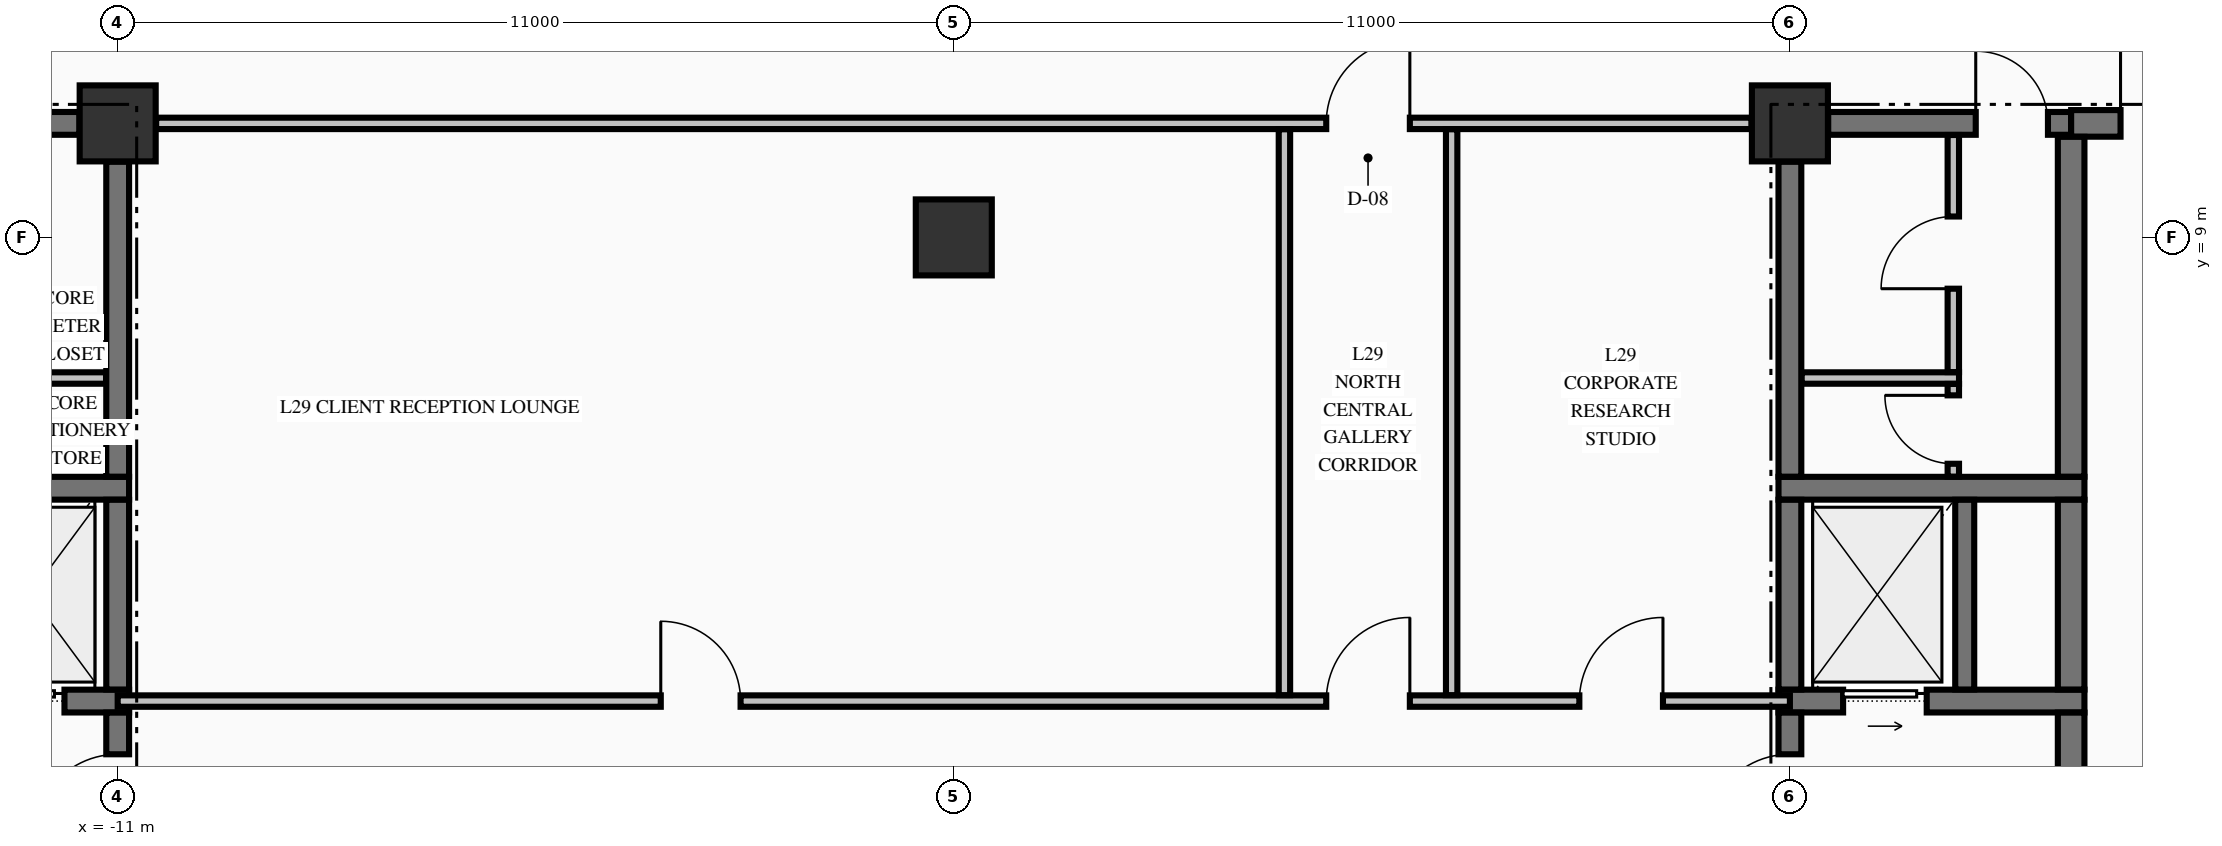
"""IFC4 building model, lengths in metres.
Left out: names, types, materials, properties, quantities, classifications, styles, units other than length and angle.
Written with IfcOpenShell. Run it as: python <this file> out.ifc"""

import sys

from ifc_helpers import new_model, si_unit, direction, frame, frame_2d, origin, origin_2d, place, context, subcontext, project, spatial, rectangle, extrude, element, fill, save


model = new_model("IFC4")
c1 = context("Model", 3, precision=1e-05, world=origin(), true_north=direction((0.0, 1.0)))
c2 = subcontext(c1, "Body", "Model", "MODEL_VIEW")
j1 = project(units=[si_unit("LENGTHUNIT", "METRE"), si_unit("PLANEANGLEUNIT", "RADIAN")], contexts=[c1])
p1 = place(None, origin())
s1 = spatial("IfcSite", under=j1, at=p1, CompositionType="ELEMENT")
p2 = place(p1, origin())
s2 = spatial("IfcBuilding", under=s1, at=p2, CompositionType="ELEMENT")
p3 = place(p2, frame((0.0, 0.0, 116.35)))
s3 = spatial("IfcBuildingStorey", under=s2, at=p3, CompositionType="ELEMENT", Elevation=116.35)
for number, where, z_axis, x_axis in (
    (1, (-11.0, 10.5, -0.425), (0.0, 0.0, 1.0), (1.0, 0.0, 0.0)),
    (2, (11.0, 10.5, -0.425), (0.0, 0.0, 1.0), (1.0, 0.0, 0.0)),
    (3, (0.0, 9.0, -0.425), (0.0, 0.0, 1.0), (1.0, 0.0, 0.0)),
):
    element("IfcColumn", number, at=place(p3, frame(where, z_axis=z_axis, x_axis=x_axis)), inside=s3, PredefinedType="COLUMN", context=c2, shape_type="SweptSolid", body=[
        extrude(rectangle(XDim=1.0, YDim=1.0, at=origin_2d()), origin(), (0.0, 0.0, 1.0), 5.0),
    ])
p4 = place(p3, frame((-14.875, 2.9, 0.0), z_axis=(0.0, 0.0, 1.0), x_axis=(1.0, 0.0, 0.0)))
e4 = element("IfcWall", 4, at=p4, inside=s3, PredefinedType="SHEAR", context=c2, shape_type="SweptSolid", body=[
    extrude(rectangle(XDim=4.025, YDim=0.3, at=frame_2d((2.012, 0.0))), origin(), (0.0, 0.0, 1.0), 4.575),
])
p5 = place(p4, frame((2.075, 0.0, 0.0)))
e5 = element("IfcOpeningElement", 5, at=p5, cuts=e4, PredefinedType="OPENING", context=c2, shape_type="SweptSolid", body=[
    extrude(rectangle(XDim=1.1, YDim=2.2, at=frame_2d((0.55, 1.1))), frame((0.0, 0.16, 0.0), z_axis=(0.0, -1.0, 0.0), x_axis=(1.0, 0.0, 0.0)), (0.0, 0.0, 1.0), 0.32),
])
p6 = place(p3, frame((10.85, 2.9, 0.0), z_axis=(0.0, 0.0, 1.0), x_axis=(1.0, 0.0, 0.0)))
e6 = element("IfcWall", 6, at=p6, inside=s3, PredefinedType="SHEAR", context=c2, shape_type="SweptSolid", body=[
    extrude(rectangle(XDim=4.025, YDim=0.3, at=frame_2d((2.012, 0.0))), origin(), (0.0, 0.0, 1.0), 4.575),
])
p7 = place(p6, frame((0.85, 0.0, 0.0)))
e7 = element("IfcOpeningElement", 7, at=p7, cuts=e6, PredefinedType="OPENING", context=c2, shape_type="SweptSolid", body=[
    extrude(rectangle(XDim=1.1, YDim=2.2, at=frame_2d((0.55, 1.1))), frame((0.0, 0.16, 0.0), z_axis=(0.0, -1.0, 0.0), x_axis=(1.0, 0.0, 0.0)), (0.0, 0.0, 1.0), 0.32),
])
for number, where, z_axis, x_axis in (
    (8, (-14.875, 5.7, 0.0), (0.0, 0.0, 1.0), (1.0, 0.0, 0.0)),
    (9, (10.85, 5.7, 0.0), (0.0, 0.0, 1.0), (1.0, 0.0, 0.0)),
):
    element("IfcWall", number, at=place(p3, frame(where, z_axis=z_axis, x_axis=x_axis)), inside=s3, PredefinedType="SHEAR", context=c2, shape_type="SweptSolid", body=[
        extrude(rectangle(XDim=4.025, YDim=0.3, at=frame_2d((2.012, 0.0))), origin(), (0.0, 0.0, 1.0), 4.575),
    ])
p8 = place(p3, frame((-14.7, 10.5, 0.0), z_axis=(0.0, 0.0, 1.0), x_axis=(1.0, 0.0, 0.0)))
e10 = element("IfcWall", 10, at=p8, inside=s3, PredefinedType="SHEAR", context=c2, shape_type="SweptSolid", body=[
    extrude(rectangle(XDim=3.196, YDim=0.3, at=frame_2d((1.598, 0.0))), origin(), (0.0, 0.0, 1.0), 4.575),
])
p9 = place(p8, frame((0.305, 0.0, 0.0)))
e11 = element("IfcOpeningElement", 11, at=p9, cuts=e10, PredefinedType="OPENING", context=c2, shape_type="SweptSolid", body=[
    extrude(rectangle(XDim=0.95, YDim=2.15, at=frame_2d((0.475, 1.075))), frame((0.0, 0.16, 0.0), z_axis=(0.0, -1.0, 0.0), x_axis=(1.0, 0.0, 0.0)), (0.0, 0.0, 1.0), 0.32),
])
p10 = place(p3, frame((11.504, 10.5, 0.0), z_axis=(0.0, 0.0, 1.0), x_axis=(1.0, 0.0, 0.0)))
e12 = element("IfcWall", 12, at=p10, inside=s3, PredefinedType="SHEAR", context=c2, shape_type="SweptSolid", body=[
    extrude(rectangle(XDim=3.196, YDim=0.3, at=frame_2d((1.598, 0.0))), origin(), (0.0, 0.0, 1.0), 4.575),
])
p11 = place(p10, frame((1.941, 0.0, 0.0)))
e13 = element("IfcOpeningElement", 13, at=p11, cuts=e12, PredefinedType="OPENING", context=c2, shape_type="SweptSolid", body=[
    extrude(rectangle(XDim=0.95, YDim=2.15, at=frame_2d((0.475, 1.075))), frame((0.0, 0.16, 0.0), z_axis=(0.0, -1.0, 0.0), x_axis=(1.0, 0.0, 0.0)), (0.0, 0.0, 1.0), 0.32),
])
p12 = place(p3, frame((14.7, 10.5, 0.0), z_axis=(0.0, 0.0, 1.0), x_axis=(1.0, 0.0, 0.0)))
e14 = element("IfcWall", 14, at=p12, inside=s3, PredefinedType="SHEAR", context=c2, shape_type="SweptSolid", body=[
    extrude(rectangle(XDim=4.796, YDim=0.35, at=frame_2d((2.398, 0.0))), origin(), (0.0, 0.0, 1.0), 4.575),
])
p13 = place(p12, frame((0.65, 0.0, 0.0)))
e15 = element("IfcOpeningElement", 15, at=p13, cuts=e14, PredefinedType="OPENING", context=c2, shape_type="SweptSolid", body=[
    extrude(rectangle(XDim=1.2, YDim=2.15, at=frame_2d((0.6, 1.075))), frame((0.0, 0.185, 0.0), z_axis=(0.0, -1.0, 0.0), x_axis=(1.0, 0.0, 0.0)), (0.0, 0.0, 1.0), 0.37),
])
p14 = place(p12, frame((3.225, 0.0, 0.0)))
e16 = element("IfcOpeningElement", 16, at=p14, cuts=e14, PredefinedType="OPENING", context=c2, shape_type="SweptSolid", body=[
    extrude(rectangle(XDim=0.95, YDim=2.15, at=frame_2d((0.475, 1.075))), frame((0.0, 0.185, 0.0), z_axis=(0.0, -1.0, 0.0), x_axis=(1.0, 0.0, 0.0)), (0.0, 0.0, 1.0), 0.37),
])
p15 = place(p3, frame((-11.0, 2.9, 0.0), z_axis=(0.0, 0.0, 1.0), x_axis=(1.0, 0.0, 0.0)))
e17 = element("IfcWall", 17, at=p15, inside=s3, PredefinedType="PARTITIONING", context=c2, shape_type="SweptSolid", body=[
    extrude(rectangle(XDim=22.0, YDim=0.15, at=frame_2d((11.0, 0.0))), origin(), (0.0, 0.0, 1.0), 4.575),
])
p16 = place(p15, frame((15.9, 0.0, 0.0)))
e18 = element("IfcOpeningElement", 18, at=p16, cuts=e17, PredefinedType="OPENING", context=c2, shape_type="SweptSolid", body=[
    extrude(rectangle(XDim=1.1, YDim=2.15, at=frame_2d((0.55, 1.075))), frame((0.0, 0.085, 0.0), z_axis=(0.0, -1.0, 0.0), x_axis=(1.0, 0.0, 0.0)), (0.0, 0.0, 1.0), 0.17),
])
p17 = place(p15, frame((7.145, 0.0, 0.0)))
e19 = element("IfcOpeningElement", 19, at=p17, cuts=e17, PredefinedType="OPENING", context=c2, shape_type="SweptSolid", body=[
    extrude(rectangle(XDim=1.05, YDim=2.15, at=frame_2d((0.525, 1.075))), frame((0.0, 0.085, 0.0), z_axis=(0.0, -1.0, 0.0), x_axis=(1.0, 0.0, 0.0)), (0.0, 0.0, 1.0), 0.17),
])
p18 = place(p15, frame((19.23, 0.0, 0.0)))
e20 = element("IfcOpeningElement", 20, at=p18, cuts=e17, PredefinedType="OPENING", context=c2, shape_type="SweptSolid", body=[
    extrude(rectangle(XDim=1.1, YDim=2.15, at=frame_2d((0.55, 1.075))), frame((0.0, 0.085, 0.0), z_axis=(0.0, -1.0, 0.0), x_axis=(1.0, 0.0, 0.0)), (0.0, 0.0, 1.0), 0.17),
])
for number, where, z_axis, x_axis in (
    (21, (-13.225, 7.15, 0.0), (0.0, 0.0, 1.0), (1.0, 0.0, 0.0)),
    (22, (11.153, 7.15, 0.0), (0.0, 0.0, 1.0), (1.0, 0.0, 0.0)),
):
    element("IfcWall", number, at=place(p3, frame(where, z_axis=z_axis, x_axis=x_axis)), inside=s3, PredefinedType="PARTITIONING", context=c2, shape_type="SweptSolid", body=[
        extrude(rectangle(XDim=2.072, YDim=0.15, at=frame_2d((1.036, 0.0))), origin(), (0.0, 0.0, 1.0), 4.575),
    ])
p19 = place(p3, frame((-10.494, 10.5, 0.0), z_axis=(0.0, 0.0, 1.0), x_axis=(1.0, 0.0, 0.0)))
e23 = element("IfcWall", 23, at=p19, inside=s3, PredefinedType="PARTITIONING", context=c2, shape_type="SweptSolid", body=[
    extrude(rectangle(XDim=20.988, YDim=0.15, at=frame_2d((10.494, 0.0))), origin(), (0.0, 0.0, 1.0), 4.575),
])
p20 = place(p19, frame((15.394, 0.0, 0.0)))
e24 = element("IfcOpeningElement", 24, at=p20, cuts=e23, PredefinedType="OPENING", context=c2, shape_type="SweptSolid", body=[
    extrude(rectangle(XDim=1.1, YDim=2.15, at=frame_2d((0.55, 1.075))), frame((0.0, 0.085, 0.0), z_axis=(0.0, -1.0, 0.0), x_axis=(1.0, 0.0, 0.0)), (0.0, 0.0, 1.0), 0.17),
])
p21 = place(p3, frame((-11.0, 0.504, 0.0), z_axis=(0.0, 0.0, 1.0), x_axis=(0.0, 1.0, 0.0)))
e25 = element("IfcWall", 25, at=p21, inside=s3, PredefinedType="SHEAR", context=c2, shape_type="SweptSolid", body=[
    extrude(rectangle(XDim=2.244, YDim=0.3, at=frame_2d((1.122, 0.0))), origin(), (0.0, 0.0, 1.0), 4.575),
])
p22 = place(p21, frame((0.596, 0.0, 0.0)))
e26 = element("IfcOpeningElement", 26, at=p22, cuts=e25, PredefinedType="OPENING", context=c2, shape_type="SweptSolid", body=[
    extrude(rectangle(XDim=1.1, YDim=2.15, at=frame_2d((0.55, 1.075))), frame((0.0, 0.16, 0.0), z_axis=(0.0, -1.0, 0.0), x_axis=(1.0, 0.0, 0.0)), (0.0, 0.0, 1.0), 0.32),
])
p23 = place(p3, frame((-11.0, 3.052, 0.0), z_axis=(0.0, 0.0, 1.0), x_axis=(0.0, 1.0, 0.0)))
e27 = element("IfcWall", 27, at=p23, inside=s3, PredefinedType="SHEAR", context=c2, shape_type="SweptSolid", body=[
    extrude(rectangle(XDim=2.496, YDim=0.3, at=frame_2d((1.248, 0.0))), origin(), (0.0, 0.0, 1.0), 4.575),
])
p24 = place(p3, frame((-11.0, 5.852, 0.0), z_axis=(0.0, 0.0, 1.0), x_axis=(0.0, 1.0, 0.0)))
e28 = element("IfcWall", 28, at=p24, inside=s3, PredefinedType="SHEAR", context=c2, shape_type="SweptSolid", body=[
    extrude(rectangle(XDim=4.144, YDim=0.3, at=frame_2d((2.072, 0.0))), origin(), (0.0, 0.0, 1.0), 4.575),
])
p25 = place(p3, frame((11.0, 0.504, 0.0), z_axis=(0.0, 0.0, 1.0), x_axis=(0.0, 1.0, 0.0)))
e29 = element("IfcWall", 29, at=p25, inside=s3, PredefinedType="SHEAR", context=c2, shape_type="SweptSolid", body=[
    extrude(rectangle(XDim=2.244, YDim=0.3, at=frame_2d((1.122, 0.0))), origin(), (0.0, 0.0, 1.0), 4.575),
])
p26 = place(p25, frame((0.596, 0.0, 0.0)))
e30 = element("IfcOpeningElement", 30, at=p26, cuts=e29, PredefinedType="OPENING", context=c2, shape_type="SweptSolid", body=[
    extrude(rectangle(XDim=1.1, YDim=2.15, at=frame_2d((0.55, 1.075))), frame((0.0, 0.16, 0.0), z_axis=(0.0, -1.0, 0.0), x_axis=(1.0, 0.0, 0.0)), (0.0, 0.0, 1.0), 0.32),
])
p27 = place(p3, frame((11.0, 3.052, 0.0), z_axis=(0.0, 0.0, 1.0), x_axis=(0.0, 1.0, 0.0)))
e31 = element("IfcWall", 31, at=p27, inside=s3, PredefinedType="SHEAR", context=c2, shape_type="SweptSolid", body=[
    extrude(rectangle(XDim=2.496, YDim=0.3, at=frame_2d((1.248, 0.0))), origin(), (0.0, 0.0, 1.0), 4.575),
])
p28 = place(p3, frame((11.0, 5.852, 0.0), z_axis=(0.0, 0.0, 1.0), x_axis=(0.0, 1.0, 0.0)))
e32 = element("IfcWall", 32, at=p28, inside=s3, PredefinedType="SHEAR", context=c2, shape_type="SweptSolid", body=[
    extrude(rectangle(XDim=4.144, YDim=0.3, at=frame_2d((2.072, 0.0))), origin(), (0.0, 0.0, 1.0), 4.575),
])
p29 = place(p3, frame((13.3, 3.052, 0.0), z_axis=(0.0, 0.0, 1.0), x_axis=(0.0, 1.0, 0.0)))
e33 = element("IfcWall", 33, at=p29, inside=s3, PredefinedType="SOLIDWALL", context=c2, shape_type="SweptSolid", body=[
    extrude(rectangle(XDim=2.496, YDim=0.25, at=frame_2d((1.248, 0.0))), origin(), (0.0, 0.0, 1.0), 4.575),
])
p30 = place(p3, frame((14.7, -0.098, 0.0), z_axis=(0.0, 0.0, 1.0), x_axis=(0.0, 1.0, 0.0)))
e34 = element("IfcWall", 34, at=p30, inside=s3, PredefinedType="SHEAR", context=c2, shape_type="SweptSolid", body=[
    extrude(rectangle(XDim=2.846, YDim=0.35, at=frame_2d((1.423, 0.0))), origin(), (0.0, 0.0, 1.0), 4.575),
])
p31 = place(p3, frame((14.7, 3.052, 0.0), z_axis=(0.0, 0.0, 1.0), x_axis=(0.0, 1.0, 0.0)))
e35 = element("IfcWall", 35, at=p31, inside=s3, PredefinedType="SHEAR", context=c2, shape_type="SweptSolid", body=[
    extrude(rectangle(XDim=2.496, YDim=0.35, at=frame_2d((1.248, 0.0))), origin(), (0.0, 0.0, 1.0), 4.575),
])
p32 = place(p3, frame((14.7, 5.852, 0.0), z_axis=(0.0, 0.0, 1.0), x_axis=(0.0, 1.0, 0.0)))
e36 = element("IfcWall", 36, at=p32, inside=s3, PredefinedType="SHEAR", context=c2, shape_type="SweptSolid", body=[
    extrude(rectangle(XDim=4.471, YDim=0.35, at=frame_2d((2.235, 0.0))), origin(), (0.0, 0.0, 1.0), 4.575),
])
for number, where, z_axis, x_axis in (
    (37, (4.35, 2.978, 0.0), (0.0, 0.0, 1.0), (0.0, 1.0, 0.0)),
    (38, (6.55, 2.978, 0.0), (0.0, 0.0, 1.0), (0.0, 1.0, 0.0)),
):
    element("IfcWall", number, at=place(p3, frame(where, z_axis=z_axis, x_axis=x_axis)), inside=s3, PredefinedType="PARTITIONING", context=c2, shape_type="SweptSolid", body=[
        extrude(rectangle(XDim=7.444, YDim=0.15, at=frame_2d((3.722, 0.0))), origin(), (0.0, 0.0, 1.0), 4.575),
    ])
p33 = place(p3, frame((13.15, 5.853, 0.0), z_axis=(0.0, 0.0, 1.0), x_axis=(0.0, 1.0, 0.0)))
e39 = element("IfcWall", 39, at=p33, inside=s3, PredefinedType="PARTITIONING", context=c2, shape_type="SweptSolid", body=[
    extrude(rectangle(XDim=1.219, YDim=0.15, at=frame_2d((0.609, 0.0))), origin(), (0.0, 0.0, 1.0), 4.575),
])
p34 = place(p33, frame((0.169, 0.0, 0.0)))
e40 = element("IfcOpeningElement", 40, at=p34, cuts=e39, PredefinedType="OPENING", context=c2, shape_type="SweptSolid", body=[
    extrude(rectangle(XDim=0.9, YDim=2.15, at=frame_2d((0.45, 1.075))), frame((0.0, 0.085, 0.0), z_axis=(0.0, -1.0, 0.0), x_axis=(1.0, 0.0, 0.0)), (0.0, 0.0, 1.0), 0.17),
])
p35 = place(p3, frame((13.15, 7.228, 0.0), z_axis=(0.0, 0.0, 1.0), x_axis=(0.0, 1.0, 0.0)))
e41 = element("IfcWall", 41, at=p35, inside=s3, PredefinedType="PARTITIONING", context=c2, shape_type="SweptSolid", body=[
    extrude(rectangle(XDim=3.119, YDim=0.15, at=frame_2d((1.56, 0.0))), origin(), (0.0, 0.0, 1.0), 4.575),
])
p36 = place(p35, frame((1.097, 0.0, 0.0)))
e42 = element("IfcOpeningElement", 42, at=p36, cuts=e41, PredefinedType="OPENING", context=c2, shape_type="SweptSolid", body=[
    extrude(rectangle(XDim=0.95, YDim=2.15, at=frame_2d((0.475, 1.075))), frame((0.0, 0.085, 0.0), z_axis=(0.0, -1.0, 0.0), x_axis=(1.0, 0.0, 0.0)), (0.0, 0.0, 1.0), 0.17),
])
p37 = place(p22, origin())
e43 = element("IfcDoor", 43, at=p37, inside=s3, OperationType="SINGLE_SWING_LEFT", PredefinedType="DOOR", context=c2, shape_type="SweptSolid", body=[
    extrude(rectangle(XDim=1.1, YDim=2.15, at=frame_2d((0.55, 1.075))), frame((0.0, 0.025, 0.0), z_axis=(0.0, -1.0, 0.0), x_axis=(1.0, 0.0, 0.0)), (0.0, 0.0, 1.0), 0.05),
])
fill(e26, e43)
p38 = place(p5, origin())
e44 = element("IfcDoor", 44, at=p38, inside=s3, OperationType="SLIDING_TO_LEFT", PredefinedType="DOOR", context=c2, shape_type="SweptSolid", body=[
    extrude(rectangle(XDim=1.1, YDim=2.2, at=frame_2d((0.55, 1.1))), frame((0.0, 0.025, 0.0), z_axis=(0.0, -1.0, 0.0), x_axis=(1.0, 0.0, 0.0)), (0.0, 0.0, 1.0), 0.05),
])
fill(e5, e44)
p39 = place(p26, origin())
e45 = element("IfcDoor", 45, at=p39, inside=s3, OperationType="SINGLE_SWING_LEFT", PredefinedType="DOOR", context=c2, shape_type="SweptSolid", body=[
    extrude(rectangle(XDim=1.1, YDim=2.15, at=frame_2d((0.55, 1.075))), frame((0.0, 0.025, 0.0), z_axis=(0.0, -1.0, 0.0), x_axis=(1.0, 0.0, 0.0)), (0.0, 0.0, 1.0), 0.05),
])
fill(e30, e45)
p40 = place(p7, origin())
e46 = element("IfcDoor", 46, at=p40, inside=s3, OperationType="SLIDING_TO_RIGHT", PredefinedType="DOOR", context=c2, shape_type="SweptSolid", body=[
    extrude(rectangle(XDim=1.1, YDim=2.2, at=frame_2d((0.55, 1.1))), frame((0.0, 0.025, 0.0), z_axis=(0.0, -1.0, 0.0), x_axis=(1.0, 0.0, 0.0)), (0.0, 0.0, 1.0), 0.05),
])
fill(e7, e46)
p41 = place(p11, origin())
e47 = element("IfcDoor", 47, at=p41, inside=s3, OperationType="SINGLE_SWING_LEFT", PredefinedType="DOOR", context=c2, shape_type="SweptSolid", body=[
    extrude(rectangle(XDim=0.95, YDim=2.15, at=frame_2d((0.475, 1.075))), frame((0.0, 0.025, 0.0), z_axis=(0.0, -1.0, 0.0), x_axis=(1.0, 0.0, 0.0)), (0.0, 0.0, 1.0), 0.05),
])
fill(e13, e47)
p42 = place(p34, origin())
e48 = element("IfcDoor", 48, at=p42, inside=s3, OperationType="SINGLE_SWING_RIGHT", PredefinedType="DOOR", context=c2, shape_type="SweptSolid", body=[
    extrude(rectangle(XDim=0.9, YDim=2.15, at=frame_2d((0.45, 1.075))), frame((0.0, 0.025, 0.0), z_axis=(0.0, -1.0, 0.0), x_axis=(1.0, 0.0, 0.0)), (0.0, 0.0, 1.0), 0.05),
])
fill(e40, e48)
p43 = place(p36, origin())
e49 = element("IfcDoor", 49, at=p43, inside=s3, OperationType="SINGLE_SWING_LEFT", PredefinedType="DOOR", context=c2, shape_type="SweptSolid", body=[
    extrude(rectangle(XDim=0.95, YDim=2.15, at=frame_2d((0.475, 1.075))), frame((0.0, 0.025, 0.0), z_axis=(0.0, -1.0, 0.0), x_axis=(1.0, 0.0, 0.0)), (0.0, 0.0, 1.0), 0.05),
])
fill(e42, e49)
p44 = place(p13, origin())
e50 = element("IfcDoor", 50, at=p44, inside=s3, OperationType="SINGLE_SWING_LEFT", PredefinedType="DOOR", context=c2, shape_type="SweptSolid", body=[
    extrude(rectangle(XDim=1.2, YDim=2.15, at=frame_2d((0.6, 1.075))), frame((0.0, 0.025, 0.0), z_axis=(0.0, -1.0, 0.0), x_axis=(1.0, 0.0, 0.0)), (0.0, 0.0, 1.0), 0.05),
])
fill(e15, e50)
p45 = place(p20, origin())
e51 = element("IfcDoor", 51, at=p45, inside=s3, OperationType="SINGLE_SWING_RIGHT", PredefinedType="DOOR", context=c2, shape_type="SweptSolid", body=[
    extrude(rectangle(XDim=1.1, YDim=2.15, at=frame_2d((0.55, 1.075))), frame((0.0, 0.025, 0.0), z_axis=(0.0, -1.0, 0.0), x_axis=(1.0, 0.0, 0.0)), (0.0, 0.0, 1.0), 0.05),
])
fill(e24, e51)
p46 = place(p16, origin())
e52 = element("IfcDoor", 52, at=p46, inside=s3, OperationType="SINGLE_SWING_RIGHT", PredefinedType="DOOR", context=c2, shape_type="SweptSolid", body=[
    extrude(rectangle(XDim=1.1, YDim=2.15, at=frame_2d((0.55, 1.075))), frame((0.0, 0.025, 0.0), z_axis=(0.0, -1.0, 0.0), x_axis=(1.0, 0.0, 0.0)), (0.0, 0.0, 1.0), 0.05),
])
fill(e18, e52)
p47 = place(p17, origin())
e53 = element("IfcDoor", 53, at=p47, inside=s3, OperationType="SINGLE_SWING_LEFT", PredefinedType="DOOR", context=c2, shape_type="SweptSolid", body=[
    extrude(rectangle(XDim=1.05, YDim=2.15, at=frame_2d((0.525, 1.075))), frame((0.0, 0.025, 0.0), z_axis=(0.0, -1.0, 0.0), x_axis=(1.0, 0.0, 0.0)), (0.0, 0.0, 1.0), 0.05),
])
fill(e19, e53)
p48 = place(p18, origin())
e54 = element("IfcDoor", 54, at=p48, inside=s3, OperationType="SINGLE_SWING_RIGHT", PredefinedType="DOOR", context=c2, shape_type="SweptSolid", body=[
    extrude(rectangle(XDim=1.1, YDim=2.15, at=frame_2d((0.55, 1.075))), frame((0.0, 0.025, 0.0), z_axis=(0.0, -1.0, 0.0), x_axis=(1.0, 0.0, 0.0)), (0.0, 0.0, 1.0), 0.05),
])
fill(e20, e54)
save(model, sys.argv[1])
